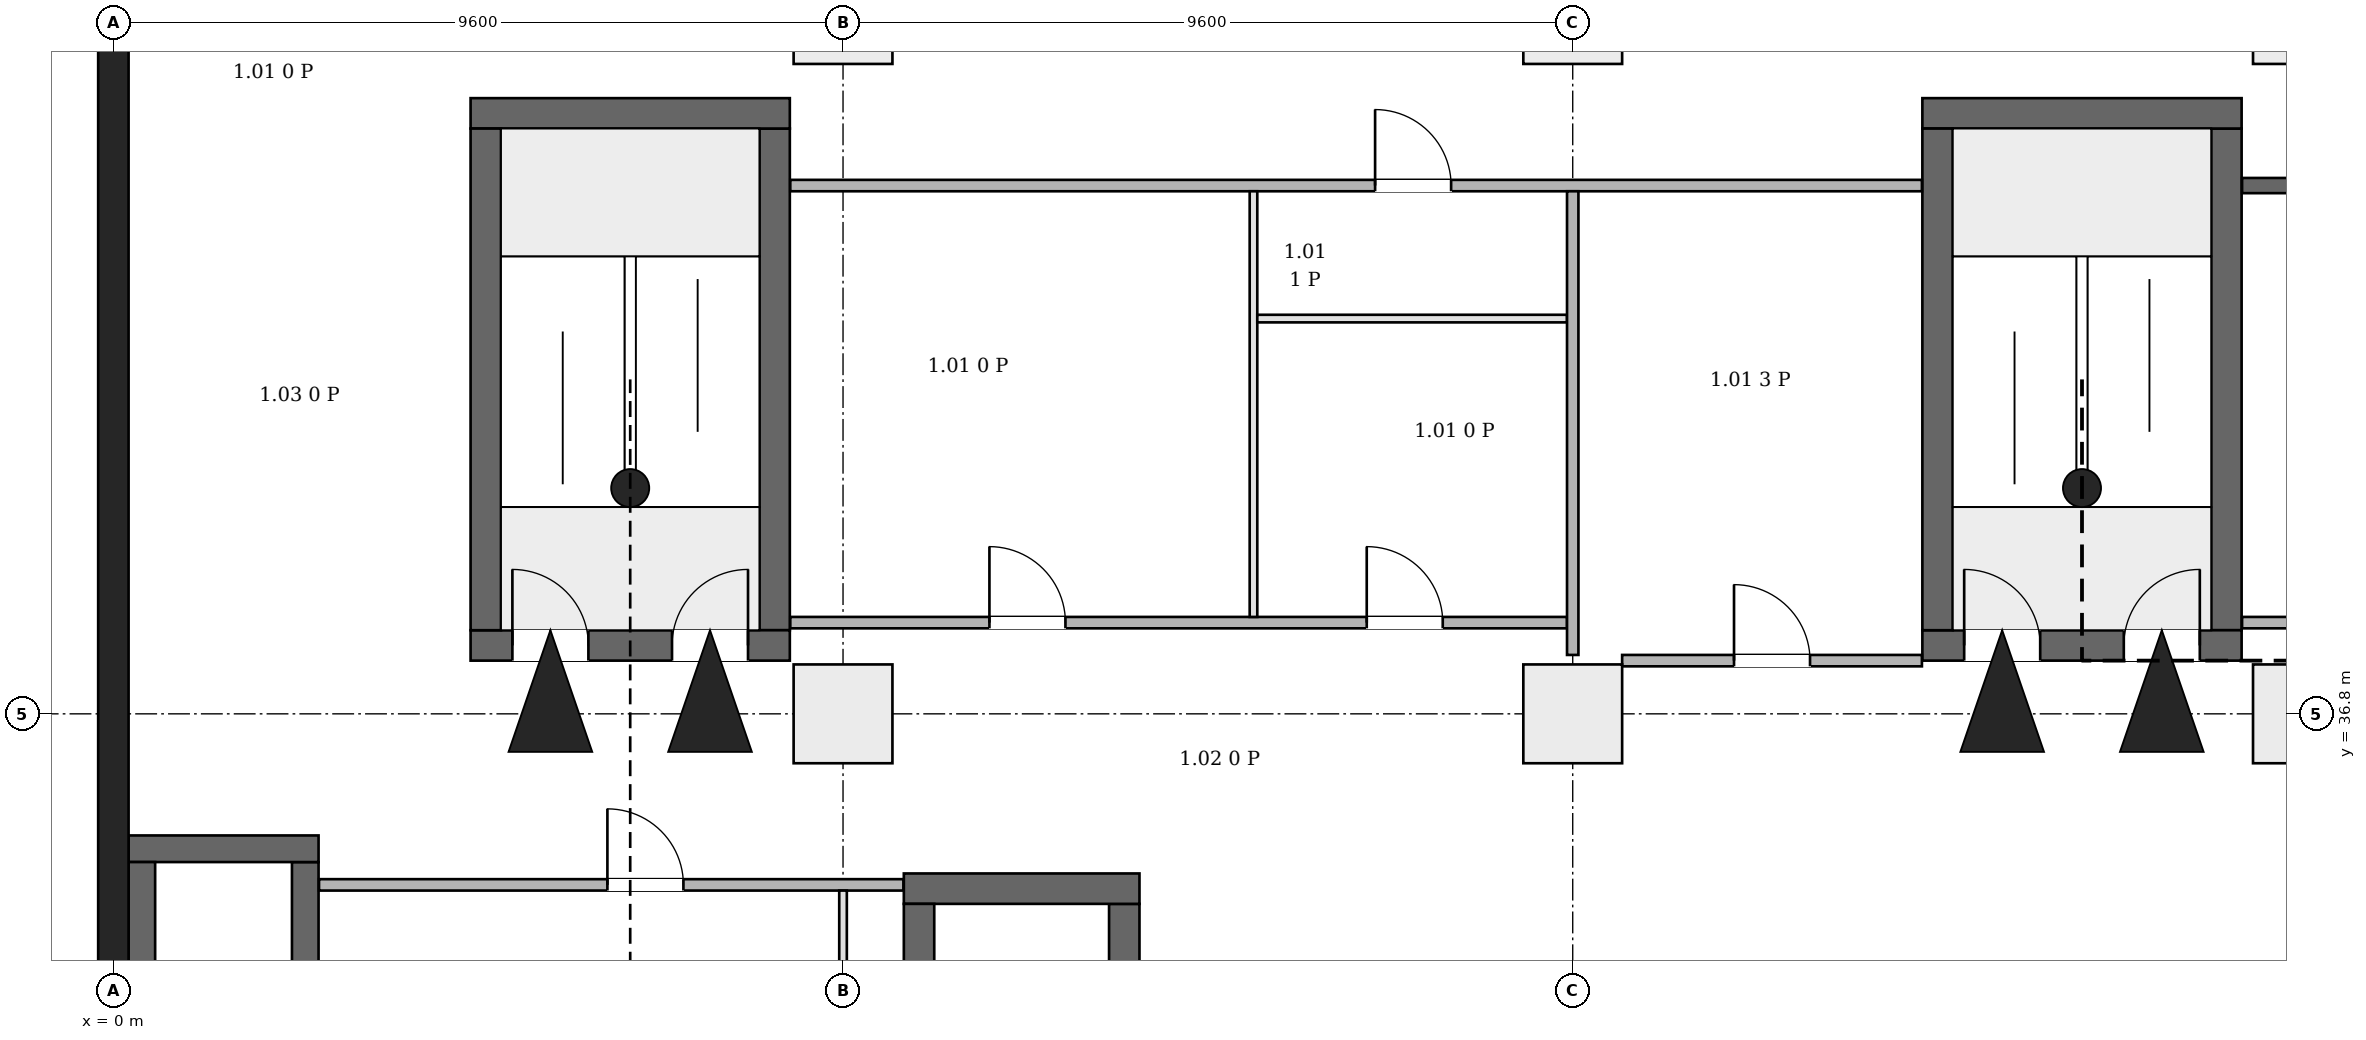
"""IFC4 building model, lengths in metres.
Left out: names, types, materials, properties, quantities, classifications, styles, units other than length and angle.
Written with IfcOpenShell. Run it as: python <this file> out.ifc"""

import sys

from ifc_helpers import new_model, si_unit, direction, frame, frame_2d, origin, origin_2d, place, context, subcontext, project, spatial, rectangle, extrude, element, fill, save


model = new_model("IFC4")
c1 = context("Model", 3, precision=1e-05, world=origin(), true_north=direction((0.0, 1.0)))
c2 = subcontext(c1, "Body", "Model", "MODEL_VIEW")
j1 = project(units=[si_unit("LENGTHUNIT", "METRE"), si_unit("PLANEANGLEUNIT", "RADIAN")], contexts=[c1])
p1 = place(None, origin())
s1 = spatial("IfcSite", under=j1, at=p1, CompositionType="ELEMENT")
p2 = place(p1, origin())
s2 = spatial("IfcBuilding", under=s1, at=p2, CompositionType="ELEMENT")
p3 = place(p2, frame((0.0, 0.0, 6.5)))
s3 = spatial("IfcBuildingStorey", under=s2, at=p3, CompositionType="ELEMENT", Elevation=6.5)
p4 = place(p3, frame((0.0, -0.2, 0.0), z_axis=(0.0, 0.0, 1.0), x_axis=(0.0, 1.0, 0.0)))
e1 = element("IfcWall", 1, at=p4, inside=s3, PredefinedType="SHEAR", context=c2, shape_type="SweptSolid", body=[
    extrude(rectangle(XDim=46.88, YDim=0.4, at=frame_2d((23.44, 0.0))), origin(), (0.0, 0.0, 1.0), 7.7),
])
p5 = place(p3, frame((4.7, 37.7, 0.0), z_axis=(0.0, 0.0, 1.0), x_axis=(1.0, 0.0, 0.0)))
e2 = element("IfcWall", 2, at=p5, inside=s3, PredefinedType="SHEAR", context=c2, shape_type="SweptSolid", body=[
    extrude(rectangle(XDim=4.2, YDim=0.4, at=frame_2d((2.1, 0.0))), origin(), (0.0, 0.0, 1.0), 7.7),
])
p6 = place(p5, frame((0.55, 0.0, 0.0)))
e3 = element("IfcOpeningElement", 3, at=p6, cuts=e2, PredefinedType="OPENING", context=c2, shape_type="SweptSolid", body=[
    extrude(rectangle(XDim=1.0, YDim=2.1, at=frame_2d((0.5, 1.05))), frame((0.0, 0.21, 0.0), z_axis=(0.0, -1.0, 0.0), x_axis=(1.0, 0.0, 0.0)), (0.0, 0.0, 1.0), 0.42),
])
p7 = place(p5, frame((2.65, 0.0, 0.0)))
e4 = element("IfcOpeningElement", 4, at=p7, cuts=e2, PredefinedType="OPENING", context=c2, shape_type="SweptSolid", body=[
    extrude(rectangle(XDim=1.0, YDim=2.1, at=frame_2d((0.5, 1.05))), frame((0.0, 0.21, 0.0), z_axis=(0.0, -1.0, 0.0), x_axis=(1.0, 0.0, 0.0)), (0.0, 0.0, 1.0), 0.42),
])
p8 = place(p3, frame((4.7, 44.7, 0.0), z_axis=(0.0, 0.0, 1.0), x_axis=(1.0, 0.0, 0.0)))
e5 = element("IfcWall", 5, at=p8, inside=s3, PredefinedType="SHEAR", context=c2, shape_type="SweptSolid", body=[
    extrude(rectangle(XDim=4.2, YDim=0.4, at=frame_2d((2.1, 0.0))), origin(), (0.0, 0.0, 1.0), 7.7),
])
for number, where, z_axis, x_axis in (
    (6, (4.9, 37.9, 0.0), (0.0, 0.0, 1.0), (0.0, 1.0, 0.0)),
    (7, (8.7, 37.9, 0.0), (0.0, 0.0, 1.0), (0.0, 1.0, 0.0)),
):
    element("IfcWall", number, at=place(p3, frame(where, z_axis=z_axis, x_axis=x_axis)), inside=s3, PredefinedType="SHEAR", context=c2, shape_type="SweptSolid", body=[
        extrude(rectangle(XDim=6.6, YDim=0.4, at=frame_2d((3.3, 0.0))), origin(), (0.0, 0.0, 1.0), 7.7),
    ])
p9 = place(p3, frame((23.8, 37.7, 0.0), z_axis=(0.0, 0.0, 1.0), x_axis=(1.0, 0.0, 0.0)))
e8 = element("IfcWall", 8, at=p9, inside=s3, PredefinedType="SHEAR", context=c2, shape_type="SweptSolid", body=[
    extrude(rectangle(XDim=4.2, YDim=0.4, at=frame_2d((2.1, 0.0))), origin(), (0.0, 0.0, 1.0), 7.7),
])
p10 = place(p9, frame((0.55, 0.0, 0.0)))
e9 = element("IfcOpeningElement", 9, at=p10, cuts=e8, PredefinedType="OPENING", context=c2, shape_type="SweptSolid", body=[
    extrude(rectangle(XDim=1.0, YDim=2.1, at=frame_2d((0.5, 1.05))), frame((0.0, 0.21, 0.0), z_axis=(0.0, -1.0, 0.0), x_axis=(1.0, 0.0, 0.0)), (0.0, 0.0, 1.0), 0.42),
])
p11 = place(p9, frame((2.65, 0.0, 0.0)))
e10 = element("IfcOpeningElement", 10, at=p11, cuts=e8, PredefinedType="OPENING", context=c2, shape_type="SweptSolid", body=[
    extrude(rectangle(XDim=1.0, YDim=2.1, at=frame_2d((0.5, 1.05))), frame((0.0, 0.21, 0.0), z_axis=(0.0, -1.0, 0.0), x_axis=(1.0, 0.0, 0.0)), (0.0, 0.0, 1.0), 0.42),
])
p12 = place(p3, frame((23.8, 44.7, 0.0), z_axis=(0.0, 0.0, 1.0), x_axis=(1.0, 0.0, 0.0)))
e11 = element("IfcWall", 11, at=p12, inside=s3, PredefinedType="SHEAR", context=c2, shape_type="SweptSolid", body=[
    extrude(rectangle(XDim=4.2, YDim=0.4, at=frame_2d((2.1, 0.0))), origin(), (0.0, 0.0, 1.0), 7.7),
])
for number, where, z_axis, x_axis in (
    (12, (24.0, 37.9, 0.0), (0.0, 0.0, 1.0), (0.0, 1.0, 0.0)),
    (13, (27.8, 37.9, 0.0), (0.0, 0.0, 1.0), (0.0, 1.0, 0.0)),
):
    element("IfcWall", number, at=place(p3, frame(where, z_axis=z_axis, x_axis=x_axis)), inside=s3, PredefinedType="SHEAR", context=c2, shape_type="SweptSolid", body=[
        extrude(rectangle(XDim=6.6, YDim=0.4, at=frame_2d((3.3, 0.0))), origin(), (0.0, 0.0, 1.0), 7.7),
    ])
p13 = place(p3, frame((0.2, 35.025, 0.0), z_axis=(0.0, 0.0, 1.0), x_axis=(1.0, 0.0, 0.0)))
e14 = element("IfcWall", 14, at=p13, inside=s3, PredefinedType="SHEAR", context=c2, shape_type="SweptSolid", body=[
    extrude(rectangle(XDim=2.5, YDim=0.35, at=frame_2d((1.25, 0.0))), origin(), (0.0, 0.0, 1.0), 7.7),
])
for number, where, z_axis, x_axis in (
    (15, (0.375, 31.35, 0.0), (0.0, 0.0, 1.0), (0.0, 1.0, 0.0)),
    (16, (2.525, 31.35, 0.0), (0.0, 0.0, 1.0), (0.0, 1.0, 0.0)),
):
    element("IfcWall", number, at=place(p3, frame(where, z_axis=z_axis, x_axis=x_axis)), inside=s3, PredefinedType="SHEAR", context=c2, shape_type="SweptSolid", body=[
        extrude(rectangle(XDim=3.5, YDim=0.35, at=frame_2d((1.75, 0.0))), origin(), (0.0, 0.0, 1.0), 7.7),
    ])
p14 = place(p3, frame((10.4, 34.5, 0.0), z_axis=(0.0, 0.0, 1.0), x_axis=(1.0, 0.0, 0.0)))
e17 = element("IfcWall", 17, at=p14, inside=s3, PredefinedType="SHEAR", context=c2, shape_type="SweptSolid", body=[
    extrude(rectangle(XDim=3.1, YDim=0.4, at=frame_2d((1.55, 0.0))), origin(), (0.0, 0.0, 1.0), 7.7),
])
for number, where, z_axis, x_axis in (
    (18, (10.6, 30.9, 0.0), (0.0, 0.0, 1.0), (0.0, 1.0, 0.0)),
    (19, (13.3, 30.9, 0.0), (0.0, 0.0, 1.0), (0.0, 1.0, 0.0)),
):
    element("IfcWall", number, at=place(p3, frame(where, z_axis=z_axis, x_axis=x_axis)), inside=s3, PredefinedType="SHEAR", context=c2, shape_type="SweptSolid", body=[
        extrude(rectangle(XDim=3.4, YDim=0.4, at=frame_2d((1.7, 0.0))), origin(), (0.0, 0.0, 1.0), 7.7),
    ])
for number, where, z_axis, x_axis in (
    (20, (9.6, 36.8, 0.0), (0.0, 0.0, 1.0), (1.0, 0.0, 0.0)),
    (21, (19.2, 36.8, 0.0), (0.0, 0.0, 1.0), (1.0, 0.0, 0.0)),
    (22, (28.8, 36.8, 0.0), (0.0, 0.0, 1.0), (1.0, 0.0, 0.0)),
    (23, (9.6, 46.0, 0.0), (0.0, 0.0, 1.0), (1.0, 0.0, 0.0)),
    (24, (19.2, 46.0, 0.0), (0.0, 0.0, 1.0), (1.0, 0.0, 0.0)),
    (25, (28.8, 46.0, 0.0), (0.0, 0.0, 1.0), (1.0, 0.0, 0.0)),
):
    element("IfcColumn", number, at=place(p3, frame(where, z_axis=z_axis, x_axis=x_axis)), inside=s3, PredefinedType="COLUMN", context=c2, shape_type="SweptSolid", body=[
        extrude(rectangle(XDim=1.3, YDim=1.3, at=origin_2d()), origin(), (0.0, 0.0, 1.0), 7.7),
    ])
p15 = place(p3, frame((2.706, 34.55, 0.0), z_axis=(0.0, 0.0, 1.0), x_axis=(1.0, 0.0, 0.0)))
e26 = element("IfcWall", 26, at=p15, inside=s3, PredefinedType="PARTITIONING", context=c2, shape_type="SweptSolid", body=[
    extrude(rectangle(XDim=7.688, YDim=0.15, at=frame_2d((3.844, 0.0))), origin(), (0.0, 0.0, 1.0), 7.35),
])
p16 = place(p15, frame((3.794, 0.0, 0.0)))
e27 = element("IfcOpeningElement", 27, at=p16, cuts=e26, PredefinedType="OPENING", context=c2, shape_type="SweptSolid", body=[
    extrude(rectangle(XDim=1.0, YDim=2.1, at=frame_2d((0.5, 1.05))), frame((0.0, 0.085, 0.0), z_axis=(0.0, -1.0, 0.0), x_axis=(1.0, 0.0, 0.0)), (0.0, 0.0, 1.0), 0.17),
])
p17 = place(p3, frame((8.906, 38.0, 0.0), z_axis=(0.0, 0.0, 1.0), x_axis=(1.0, 0.0, 0.0)))
e28 = element("IfcWall", 28, at=p17, inside=s3, PredefinedType="PARTITIONING", context=c2, shape_type="SweptSolid", body=[
    extrude(rectangle(XDim=10.219, YDim=0.15, at=frame_2d((5.109, 0.0))), origin(), (0.0, 0.0, 1.0), 7.35),
])
p18 = place(p17, frame((2.62, 0.0, 0.0)))
e29 = element("IfcOpeningElement", 29, at=p18, cuts=e28, PredefinedType="OPENING", context=c2, shape_type="SweptSolid", body=[
    extrude(rectangle(XDim=1.0, YDim=2.1, at=frame_2d((0.5, 1.05))), frame((0.0, 0.085, 0.0), z_axis=(0.0, -1.0, 0.0), x_axis=(1.0, 0.0, 0.0)), (0.0, 0.0, 1.0), 0.17),
])
p19 = place(p17, frame((7.584, 0.0, 0.0)))
e30 = element("IfcOpeningElement", 30, at=p19, cuts=e28, PredefinedType="OPENING", context=c2, shape_type="SweptSolid", body=[
    extrude(rectangle(XDim=1.0, YDim=2.1, at=frame_2d((0.5, 1.05))), frame((0.0, 0.085, 0.0), z_axis=(0.0, -1.0, 0.0), x_axis=(1.0, 0.0, 0.0)), (0.0, 0.0, 1.0), 0.17),
])
p20 = place(p3, frame((8.906, 43.75, 0.0), z_axis=(0.0, 0.0, 1.0), x_axis=(1.0, 0.0, 0.0)))
e31 = element("IfcWall", 31, at=p20, inside=s3, PredefinedType="PARTITIONING", context=c2, shape_type="SweptSolid", body=[
    extrude(rectangle(XDim=14.888, YDim=0.15, at=frame_2d((7.444, 0.0))), origin(), (0.0, 0.0, 1.0), 7.35),
])
p21 = place(p20, frame((7.694, 0.0, 0.0)))
e32 = element("IfcOpeningElement", 32, at=p21, cuts=e31, PredefinedType="OPENING", context=c2, shape_type="SweptSolid", body=[
    extrude(rectangle(XDim=1.0, YDim=2.1, at=frame_2d((0.5, 1.05))), frame((0.0, 0.085, 0.0), z_axis=(0.0, -1.0, 0.0), x_axis=(1.0, 0.0, 0.0)), (0.0, 0.0, 1.0), 0.17),
])
p22 = place(p3, frame((9.6, 31.075, 0.0), z_axis=(0.0, 0.0, 1.0), x_axis=(0.0, 1.0, 0.0)))
e33 = element("IfcWall", 33, at=p22, inside=s3, PredefinedType="PARTITIONING", context=c2, shape_type="SweptSolid", body=[
    extrude(rectangle(XDim=3.4, YDim=0.1, at=frame_2d((1.7, 0.0))), origin(), (0.0, 0.0, 1.0), 6.95),
])
p23 = place(p3, frame((15.0, 38.075, 0.0), z_axis=(0.0, 0.0, 1.0), x_axis=(0.0, 1.0, 0.0)))
e34 = element("IfcWall", 34, at=p23, inside=s3, PredefinedType="PARTITIONING", context=c2, shape_type="SweptSolid", body=[
    extrude(rectangle(XDim=5.6, YDim=0.1, at=frame_2d((2.8, 0.0))), origin(), (0.0, 0.0, 1.0), 7.35),
])
p24 = place(p3, frame((15.05, 42.0, 0.0), z_axis=(0.0, 0.0, 1.0), x_axis=(1.0, 0.0, 0.0)))
e35 = element("IfcWall", 35, at=p24, inside=s3, PredefinedType="PARTITIONING", context=c2, shape_type="SweptSolid", body=[
    extrude(rectangle(XDim=4.075, YDim=0.1, at=frame_2d((2.038, 0.0))), origin(), (0.0, 0.0, 1.0), 7.35),
])
p25 = place(p3, frame((19.2, 37.575, 0.0), z_axis=(0.0, 0.0, 1.0), x_axis=(0.0, 1.0, 0.0)))
e36 = element("IfcWall", 36, at=p25, inside=s3, PredefinedType="PARTITIONING", context=c2, shape_type="SweptSolid", body=[
    extrude(rectangle(XDim=6.1, YDim=0.15, at=frame_2d((3.05, 0.0))), origin(), (0.0, 0.0, 1.0), 6.95),
])
p26 = place(p3, frame((19.85, 37.5, 0.0), z_axis=(0.0, 0.0, 1.0), x_axis=(1.0, 0.0, 0.0)))
e37 = element("IfcWall", 37, at=p26, inside=s3, PredefinedType="PARTITIONING", context=c2, shape_type="SweptSolid", body=[
    extrude(rectangle(XDim=3.944, YDim=0.15, at=frame_2d((1.972, 0.0))), origin(), (0.0, 0.0, 1.0), 7.35),
])
p27 = place(p26, frame((1.472, 0.0, 0.0)))
e38 = element("IfcOpeningElement", 38, at=p27, cuts=e37, PredefinedType="OPENING", context=c2, shape_type="SweptSolid", body=[
    extrude(rectangle(XDim=1.0, YDim=2.1, at=frame_2d((0.5, 1.05))), frame((0.0, 0.085, 0.0), z_axis=(0.0, -1.0, 0.0), x_axis=(1.0, 0.0, 0.0)), (0.0, 0.0, 1.0), 0.17),
])
p28 = place(p3, frame((28.006, 38.0, 0.0), z_axis=(0.0, 0.0, 1.0), x_axis=(1.0, 0.0, 0.0)))
e39 = element("IfcWall", 39, at=p28, inside=s3, PredefinedType="PARTITIONING", context=c2, shape_type="SweptSolid", body=[
    extrude(rectangle(XDim=1.894, YDim=0.15, at=frame_2d((0.947, 0.0))), origin(), (0.0, 0.0, 1.0), 7.35),
])
p29 = place(p3, frame((28.006, 43.75, 0.0), z_axis=(0.0, 0.0, 1.0), x_axis=(1.0, 0.0, 0.0)))
e40 = element("IfcWall", 40, at=p29, inside=s3, PredefinedType="PARTITIONING", context=c2, shape_type="SweptSolid", body=[
    extrude(rectangle(XDim=29.388, YDim=0.2, at=frame_2d((14.694, 0.0))), origin(), (0.0, 0.0, 1.0), 7.35),
])
p30 = place(p6, origin())
e41 = element("IfcDoor", 41, at=p30, inside=s3, OperationType="SINGLE_SWING_RIGHT", PredefinedType="DOOR", context=c2, shape_type="SweptSolid", body=[
    extrude(rectangle(XDim=1.0, YDim=2.1, at=frame_2d((0.5, 1.05))), frame((0.0, 0.025, 0.0), z_axis=(0.0, -1.0, 0.0), x_axis=(1.0, 0.0, 0.0)), (0.0, 0.0, 1.0), 0.05),
])
fill(e3, e41)
p31 = place(p7, origin())
e42 = element("IfcDoor", 42, at=p31, inside=s3, OperationType="SINGLE_SWING_LEFT", PredefinedType="DOOR", context=c2, shape_type="SweptSolid", body=[
    extrude(rectangle(XDim=1.0, YDim=2.1, at=frame_2d((0.5, 1.05))), frame((0.0, 0.025, 0.0), z_axis=(0.0, -1.0, 0.0), x_axis=(1.0, 0.0, 0.0)), (0.0, 0.0, 1.0), 0.05),
])
fill(e4, e42)
p32 = place(p10, origin())
e43 = element("IfcDoor", 43, at=p32, inside=s3, OperationType="SINGLE_SWING_RIGHT", PredefinedType="DOOR", context=c2, shape_type="SweptSolid", body=[
    extrude(rectangle(XDim=1.0, YDim=2.1, at=frame_2d((0.5, 1.05))), frame((0.0, 0.025, 0.0), z_axis=(0.0, -1.0, 0.0), x_axis=(1.0, 0.0, 0.0)), (0.0, 0.0, 1.0), 0.05),
])
fill(e9, e43)
p33 = place(p11, origin())
e44 = element("IfcDoor", 44, at=p33, inside=s3, OperationType="SINGLE_SWING_LEFT", PredefinedType="DOOR", context=c2, shape_type="SweptSolid", body=[
    extrude(rectangle(XDim=1.0, YDim=2.1, at=frame_2d((0.5, 1.05))), frame((0.0, 0.025, 0.0), z_axis=(0.0, -1.0, 0.0), x_axis=(1.0, 0.0, 0.0)), (0.0, 0.0, 1.0), 0.05),
])
fill(e10, e44)
p34 = place(p16, origin())
e45 = element("IfcDoor", 45, at=p34, inside=s3, OperationType="SINGLE_SWING_LEFT", PredefinedType="DOOR", context=c2, shape_type="SweptSolid", body=[
    extrude(rectangle(XDim=1.0, YDim=2.1, at=frame_2d((0.5, 1.05))), frame((0.0, 0.025, 0.0), z_axis=(0.0, -1.0, 0.0), x_axis=(1.0, 0.0, 0.0)), (0.0, 0.0, 1.0), 0.05),
])
fill(e27, e45)
p35 = place(p18, origin())
e46 = element("IfcDoor", 46, at=p35, inside=s3, OperationType="SINGLE_SWING_LEFT", PredefinedType="DOOR", context=c2, shape_type="SweptSolid", body=[
    extrude(rectangle(XDim=1.0, YDim=2.1, at=frame_2d((0.5, 1.05))), frame((0.0, 0.025, 0.0), z_axis=(0.0, -1.0, 0.0), x_axis=(1.0, 0.0, 0.0)), (0.0, 0.0, 1.0), 0.05),
])
fill(e29, e46)
p36 = place(p19, origin())
e47 = element("IfcDoor", 47, at=p36, inside=s3, OperationType="SINGLE_SWING_RIGHT", PredefinedType="DOOR", context=c2, shape_type="SweptSolid", body=[
    extrude(rectangle(XDim=1.0, YDim=2.1, at=frame_2d((0.5, 1.05))), frame((0.0, 0.025, 0.0), z_axis=(0.0, -1.0, 0.0), x_axis=(1.0, 0.0, 0.0)), (0.0, 0.0, 1.0), 0.05),
])
fill(e30, e47)
p37 = place(p21, origin())
e48 = element("IfcDoor", 48, at=p37, inside=s3, OperationType="SINGLE_SWING_LEFT", PredefinedType="DOOR", context=c2, shape_type="SweptSolid", body=[
    extrude(rectangle(XDim=1.0, YDim=2.1, at=frame_2d((0.5, 1.05))), frame((0.0, 0.025, 0.0), z_axis=(0.0, -1.0, 0.0), x_axis=(1.0, 0.0, 0.0)), (0.0, 0.0, 1.0), 0.05),
])
fill(e32, e48)
p38 = place(p27, origin())
e49 = element("IfcDoor", 49, at=p38, inside=s3, OperationType="SINGLE_SWING_LEFT", PredefinedType="DOOR", context=c2, shape_type="SweptSolid", body=[
    extrude(rectangle(XDim=1.0, YDim=2.1, at=frame_2d((0.5, 1.05))), frame((0.0, 0.025, 0.0), z_axis=(0.0, -1.0, 0.0), x_axis=(1.0, 0.0, 0.0)), (0.0, 0.0, 1.0), 0.05),
])
fill(e38, e49)
save(model, sys.argv[1])
